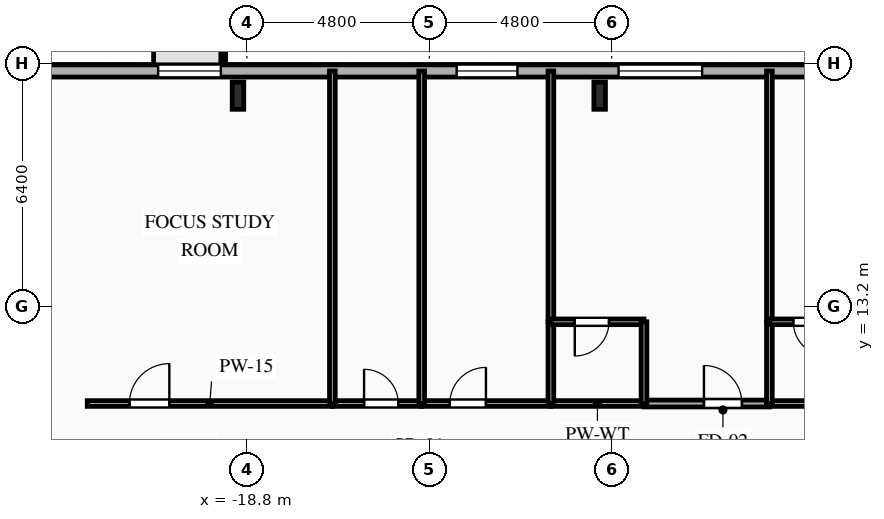
"""IFC4 building model, lengths in metres.
Left out: names, types, materials, properties, quantities, classifications, styles, units other than length and angle.
Written with IfcOpenShell. Run it as: python <this file> out.ifc"""

import sys

from ifc_helpers import new_model, si_unit, direction, frame, frame_2d, origin, origin_2d, place, context, subcontext, project, spatial, rectangle, i_section, extrude, element, fill, save


model = new_model("IFC4")
c1 = context("Model", 3, precision=1e-05, world=origin(), true_north=direction((0.0, 1.0)))
c2 = subcontext(c1, "Body", "Model", "MODEL_VIEW")
j1 = project(units=[si_unit("LENGTHUNIT", "METRE"), si_unit("PLANEANGLEUNIT", "RADIAN")], contexts=[c1])
p1 = place(None, origin())
s1 = spatial("IfcSite", under=j1, at=p1, CompositionType="ELEMENT")
p2 = place(p1, origin())
s2 = spatial("IfcBuilding", under=s1, at=p2, CompositionType="ELEMENT")
p3 = place(p2, frame((0.0, 0.0, 57.15)))
s3 = spatial("IfcBuildingStorey", under=s2, at=p3, CompositionType="ELEMENT", Elevation=57.15)
for number, where, z_axis, x_axis in (
    (1, (-9.517, 18.75, 0.0), (0.0, 0.0, 1.0), (1.0, 0.0, 0.0)),
    (2, (-19.033, 18.75, 0.0), (0.0, 0.0, 1.0), (1.0, 0.0, 0.0)),
):
    element("IfcColumn", number, at=place(p3, frame(where, z_axis=z_axis, x_axis=x_axis)), inside=s3, PredefinedType="COLUMN", context=c2, shape_type="SweptSolid", body=[
        extrude(i_section(OverallWidth=0.304, OverallDepth=0.716, WebThickness=0.021, FlangeThickness=0.04, FilletRadius=0.027, at=origin_2d()), origin(), (0.0, 0.0, 1.0), 3.35),
    ])
p4 = place(p3, frame((-29.2, 19.4, 0.0), z_axis=(0.0, 0.0, 1.0), x_axis=(1.0, 0.0, 0.0)))
e3 = element("IfcWall", 3, at=p4, inside=s3, PredefinedType="SOLIDWALL", context=c2, shape_type="SweptSolid", body=[
    extrude(rectangle(XDim=58.4, YDim=0.32, at=frame_2d((29.2, 0.0))), origin(), (0.0, 0.0, 1.0), 3.035),
])
p5 = place(p4, frame((8.065, 0.0, 0.85)))
e4 = element("IfcOpeningElement", 4, at=p5, cuts=e3, PredefinedType="OPENING", context=c2, shape_type="SweptSolid", body=[
    extrude(rectangle(XDim=1.65, YDim=1.85, at=frame_2d((0.825, 0.925))), frame((0.0, 0.17, 0.0), z_axis=(0.0, -1.0, 0.0), x_axis=(1.0, 0.0, 0.0)), (0.0, 0.0, 1.0), 0.34),
])
p6 = place(p4, frame((15.92, 0.0, 0.85)))
e5 = element("IfcOpeningElement", 5, at=p6, cuts=e3, PredefinedType="OPENING", context=c2, shape_type="SweptSolid", body=[
    extrude(rectangle(XDim=1.6, YDim=1.85, at=frame_2d((0.8, 0.925))), frame((0.0, 0.17, 0.0), z_axis=(0.0, -1.0, 0.0), x_axis=(1.0, 0.0, 0.0)), (0.0, 0.0, 1.0), 0.34),
])
p7 = place(p4, frame((20.18, 0.0, 0.85)))
e6 = element("IfcOpeningElement", 6, at=p7, cuts=e3, PredefinedType="OPENING", context=c2, shape_type="SweptSolid", body=[
    extrude(rectangle(XDim=2.2, YDim=1.85, at=frame_2d((1.1, 0.925))), frame((0.0, 0.17, 0.0), z_axis=(0.0, -1.0, 0.0), x_axis=(1.0, 0.0, 0.0)), (0.0, 0.0, 1.0), 0.34),
])
p8 = place(p4, frame((25.94, 0.0, 0.85)))
e7 = element("IfcOpeningElement", 7, at=p8, cuts=e3, PredefinedType="OPENING", context=c2, shape_type="SweptSolid", body=[
    extrude(rectangle(XDim=2.2, YDim=1.85, at=frame_2d((1.1, 0.925))), frame((0.0, 0.17, 0.0), z_axis=(0.0, -1.0, 0.0), x_axis=(1.0, 0.0, 0.0)), (0.0, 0.0, 1.0), 0.34),
])
p9 = place(p4, frame((31.7, 0.0, 0.85)))
e8 = element("IfcOpeningElement", 8, at=p9, cuts=e3, PredefinedType="OPENING", context=c2, shape_type="SweptSolid", body=[
    extrude(rectangle(XDim=2.2, YDim=1.85, at=frame_2d((1.1, 0.925))), frame((0.0, 0.17, 0.0), z_axis=(0.0, -1.0, 0.0), x_axis=(1.0, 0.0, 0.0)), (0.0, 0.0, 1.0), 0.34),
])
p10 = place(p4, frame((36.056, 0.0, 0.85)))
e9 = element("IfcOpeningElement", 9, at=p10, cuts=e3, PredefinedType="OPENING", context=c2, shape_type="SweptSolid", body=[
    extrude(rectangle(XDim=2.2, YDim=1.85, at=frame_2d((1.1, 0.925))), frame((0.0, 0.17, 0.0), z_axis=(0.0, -1.0, 0.0), x_axis=(1.0, 0.0, 0.0)), (0.0, 0.0, 1.0), 0.34),
])
p11 = place(p4, frame((43.22, 0.0, 0.85)))
e10 = element("IfcOpeningElement", 10, at=p11, cuts=e3, PredefinedType="OPENING", context=c2, shape_type="SweptSolid", body=[
    extrude(rectangle(XDim=2.2, YDim=1.85, at=frame_2d((1.1, 0.925))), frame((0.0, 0.17, 0.0), z_axis=(0.0, -1.0, 0.0), x_axis=(1.0, 0.0, 0.0)), (0.0, 0.0, 1.0), 0.34),
])
p12 = place(p4, frame((48.895, 0.0, 0.85)))
e11 = element("IfcOpeningElement", 11, at=p12, cuts=e3, PredefinedType="OPENING", context=c2, shape_type="SweptSolid", body=[
    extrude(rectangle(XDim=1.65, YDim=1.85, at=frame_2d((0.825, 0.925))), frame((0.0, 0.17, 0.0), z_axis=(0.0, -1.0, 0.0), x_axis=(1.0, 0.0, 0.0)), (0.0, 0.0, 1.0), 0.34),
])
p13 = place(p3, frame((-23.0, 10.65, 0.0), z_axis=(0.0, 0.0, 1.0), x_axis=(1.0, 0.0, 0.0)))
e12 = element("IfcWall", 12, at=p13, inside=s3, PredefinedType="PARTITIONING", context=c2, shape_type="SweptSolid", body=[
    extrude(rectangle(XDim=6.45, YDim=0.15, at=frame_2d((3.225, 0.0))), origin(), (0.0, 0.0, 1.0), 3.035),
])
p14 = place(p13, frame((1.11, 0.0, 0.0)))
e13 = element("IfcOpeningElement", 13, at=p14, cuts=e12, PredefinedType="OPENING", context=c2, shape_type="SweptSolid", body=[
    extrude(rectangle(XDim=1.05, YDim=2.15, at=frame_2d((0.525, 1.075))), frame((0.0, 0.085, 0.0), z_axis=(0.0, -1.0, 0.0), x_axis=(1.0, 0.0, 0.0)), (0.0, 0.0, 1.0), 0.17),
])
p15 = place(p3, frame((-16.55, 10.65, 0.0), z_axis=(0.0, 0.0, 1.0), x_axis=(1.0, 0.0, 0.0)))
e14 = element("IfcWall", 14, at=p15, inside=s3, PredefinedType="PLUMBINGWALL", context=c2, shape_type="SweptSolid", body=[
    extrude(rectangle(XDim=2.35, YDim=0.15, at=frame_2d((1.175, 0.0))), origin(), (0.0, 0.0, 1.0), 3.035),
])
p16 = place(p15, frame((0.834, 0.0, 0.0)))
e15 = element("IfcOpeningElement", 15, at=p16, cuts=e14, PredefinedType="OPENING", context=c2, shape_type="SweptSolid", body=[
    extrude(rectangle(XDim=0.9, YDim=2.1, at=frame_2d((0.45, 1.05))), frame((0.0, 0.085, 0.0), z_axis=(0.0, -1.0, 0.0), x_axis=(1.0, 0.0, 0.0)), (0.0, 0.0, 1.0), 0.17),
])
p17 = place(p3, frame((-14.2, 10.65, 0.0), z_axis=(0.0, 0.0, 1.0), x_axis=(1.0, 0.0, 0.0)))
e16 = element("IfcWall", 16, at=p17, inside=s3, PredefinedType="PARTITIONING", context=c2, shape_type="SweptSolid", body=[
    extrude(rectangle(XDim=3.4, YDim=0.15, at=frame_2d((1.7, 0.0))), origin(), (0.0, 0.0, 1.0), 3.035),
])
p18 = place(p17, frame((0.741, 0.0, 0.0)))
e17 = element("IfcOpeningElement", 17, at=p18, cuts=e16, PredefinedType="OPENING", context=c2, shape_type="SweptSolid", body=[
    extrude(rectangle(XDim=0.95, YDim=2.1, at=frame_2d((0.475, 1.05))), frame((0.0, 0.085, 0.0), z_axis=(0.0, -1.0, 0.0), x_axis=(1.0, 0.0, 0.0)), (0.0, 0.0, 1.0), 0.17),
])
p19 = place(p3, frame((-8.35, 10.65, 0.0), z_axis=(0.0, 0.0, 1.0), x_axis=(1.0, 0.0, 0.0)))
e18 = element("IfcWall", 18, at=p19, inside=s3, PredefinedType="PARTITIONING", context=c2, shape_type="SweptSolid", body=[
    extrude(rectangle(XDim=3.3, YDim=0.18, at=frame_2d((1.65, 0.0))), origin(), (0.0, 0.0, 1.0), 3.035),
])
p20 = place(p19, frame((1.577, 0.0, 0.0)))
e19 = element("IfcOpeningElement", 19, at=p20, cuts=e18, PredefinedType="OPENING", context=c2, shape_type="SweptSolid", body=[
    extrude(rectangle(XDim=1.0, YDim=2.15, at=frame_2d((0.5, 1.075))), frame((0.0, 0.1, 0.0), z_axis=(0.0, -1.0, 0.0), x_axis=(1.0, 0.0, 0.0)), (0.0, 0.0, 1.0), 0.2),
])
for number, where, z_axis, x_axis in (
    (20, (-10.8, 10.65, 0.0), (0.0, 0.0, 1.0), (1.0, 0.0, 0.0)),
    (21, (-5.05, 10.65, 0.0), (0.0, 0.0, 1.0), (1.0, 0.0, 0.0)),
):
    element("IfcWall", number, at=place(p3, frame(where, z_axis=z_axis, x_axis=x_axis)), inside=s3, PredefinedType="PLUMBINGWALL", context=c2, shape_type="SweptSolid", body=[
        extrude(rectangle(XDim=2.45, YDim=0.15, at=frame_2d((1.225, 0.0))), origin(), (0.0, 0.0, 1.0), 3.035),
    ])
for number, where, z_axis, x_axis in (
    (22, (-16.55, 19.4, 0.0), (0.0, 0.0, 1.0), (0.0, -1.0, 0.0)),
    (23, (-14.2, 19.4, 0.0), (0.0, 0.0, 1.0), (0.0, -1.0, 0.0)),
):
    element("IfcWall", number, at=place(p3, frame(where, z_axis=z_axis, x_axis=x_axis)), inside=s3, PredefinedType="PLUMBINGWALL", context=c2, shape_type="SweptSolid", body=[
        extrude(rectangle(XDim=8.75, YDim=0.15, at=frame_2d((4.375, 0.0))), origin(), (0.0, 0.0, 1.0), 3.035),
    ])
p21 = place(p3, frame((-10.8, 19.4, 0.0), z_axis=(0.0, 0.0, 1.0), x_axis=(0.0, -1.0, 0.0)))
e24 = element("IfcWall", 24, at=p21, inside=s3, PredefinedType="PARTITIONING", context=c2, shape_type="SweptSolid", body=[
    extrude(rectangle(XDim=6.6, YDim=0.15, at=frame_2d((3.3, 0.0))), origin(), (0.0, 0.0, 1.0), 3.035),
])
p22 = place(p3, frame((-10.8, 12.8, 0.0), z_axis=(0.0, 0.0, 1.0), x_axis=(0.0, -1.0, 0.0)))
e25 = element("IfcWall", 25, at=p22, inside=s3, PredefinedType="PLUMBINGWALL", context=c2, shape_type="SweptSolid", body=[
    extrude(rectangle(XDim=2.15, YDim=0.15, at=frame_2d((1.075, 0.0))), origin(), (0.0, 0.0, 1.0), 3.035),
])
p23 = place(p3, frame((-8.35, 12.8, 0.0), z_axis=(0.0, 0.0, 1.0), x_axis=(-1.0, 0.0, 0.0)))
e26 = element("IfcWall", 26, at=p23, inside=s3, PredefinedType="PLUMBINGWALL", context=c2, shape_type="SweptSolid", body=[
    extrude(rectangle(XDim=2.45, YDim=0.15, at=frame_2d((1.225, 0.0))), origin(), (0.0, 0.0, 1.0), 3.035),
])
p24 = place(p23, frame((0.921, 0.0, 0.0)))
e27 = element("IfcOpeningElement", 27, at=p24, cuts=e26, PredefinedType="OPENING", context=c2, shape_type="SweptSolid", body=[
    extrude(rectangle(XDim=0.9, YDim=2.1, at=frame_2d((0.45, 1.05))), frame((0.0, 0.085, 0.0), z_axis=(0.0, -1.0, 0.0), x_axis=(1.0, 0.0, 0.0)), (0.0, 0.0, 1.0), 0.17),
])
p25 = place(p3, frame((-8.35, 10.65, 0.0), z_axis=(0.0, 0.0, 1.0), x_axis=(0.0, 1.0, 0.0)))
e28 = element("IfcWall", 28, at=p25, inside=s3, PredefinedType="PLUMBINGWALL", context=c2, shape_type="SweptSolid", body=[
    extrude(rectangle(XDim=2.15, YDim=0.15, at=frame_2d((1.075, 0.0))), origin(), (0.0, 0.0, 1.0), 3.035),
])
p26 = place(p3, frame((-5.05, 19.4, 0.0), z_axis=(0.0, 0.0, 1.0), x_axis=(0.0, -1.0, 0.0)))
e29 = element("IfcWall", 29, at=p26, inside=s3, PredefinedType="PARTITIONING", context=c2, shape_type="SweptSolid", body=[
    extrude(rectangle(XDim=6.6, YDim=0.15, at=frame_2d((3.3, 0.0))), origin(), (0.0, 0.0, 1.0), 3.035),
])
p27 = place(p3, frame((-5.05, 12.8, 0.0), z_axis=(0.0, 0.0, 1.0), x_axis=(0.0, -1.0, 0.0)))
e30 = element("IfcWall", 30, at=p27, inside=s3, PredefinedType="PLUMBINGWALL", context=c2, shape_type="SweptSolid", body=[
    extrude(rectangle(XDim=2.15, YDim=0.15, at=frame_2d((1.075, 0.0))), origin(), (0.0, 0.0, 1.0), 3.035),
])
p28 = place(p3, frame((-2.6, 12.8, 0.0), z_axis=(0.0, 0.0, 1.0), x_axis=(-1.0, 0.0, 0.0)))
e31 = element("IfcWall", 31, at=p28, inside=s3, PredefinedType="PLUMBINGWALL", context=c2, shape_type="SweptSolid", body=[
    extrude(rectangle(XDim=2.45, YDim=0.15, at=frame_2d((1.225, 0.0))), origin(), (0.0, 0.0, 1.0), 3.035),
])
p29 = place(p28, frame((0.921, 0.0, 0.0)))
e32 = element("IfcOpeningElement", 32, at=p29, cuts=e31, PredefinedType="OPENING", context=c2, shape_type="SweptSolid", body=[
    extrude(rectangle(XDim=0.9, YDim=2.1, at=frame_2d((0.45, 1.05))), frame((0.0, 0.085, 0.0), z_axis=(0.0, -1.0, 0.0), x_axis=(1.0, 0.0, 0.0)), (0.0, 0.0, 1.0), 0.17),
])
p30 = place(p5, origin())
e33 = element("IfcWindow", 33, at=p30, inside=s3, PartitioningType="SINGLE_PANEL", PredefinedType="WINDOW", context=c2, shape_type="SweptSolid", body=[
    extrude(rectangle(XDim=1.65, YDim=1.85, at=frame_2d((0.825, 0.925))), frame((0.0, 0.03, 0.0), z_axis=(0.0, -1.0, 0.0), x_axis=(1.0, 0.0, 0.0)), (0.0, 0.0, 1.0), 0.06),
])
fill(e4, e33)
p31 = place(p6, origin())
e34 = element("IfcWindow", 34, at=p31, inside=s3, PartitioningType="SINGLE_PANEL", PredefinedType="WINDOW", context=c2, shape_type="SweptSolid", body=[
    extrude(rectangle(XDim=1.6, YDim=1.85, at=frame_2d((0.8, 0.925))), frame((0.0, 0.03, 0.0), z_axis=(0.0, -1.0, 0.0), x_axis=(1.0, 0.0, 0.0)), (0.0, 0.0, 1.0), 0.06),
])
fill(e5, e34)
p32 = place(p7, origin())
e35 = element("IfcWindow", 35, at=p32, inside=s3, PartitioningType="SINGLE_PANEL", PredefinedType="WINDOW", context=c2, shape_type="SweptSolid", body=[
    extrude(rectangle(XDim=2.2, YDim=1.85, at=frame_2d((1.1, 0.925))), frame((0.0, 0.03, 0.0), z_axis=(0.0, -1.0, 0.0), x_axis=(1.0, 0.0, 0.0)), (0.0, 0.0, 1.0), 0.06),
])
fill(e6, e35)
p33 = place(p14, origin())
e36 = element("IfcDoor", 36, at=p33, inside=s3, OperationType="SINGLE_SWING_RIGHT", PredefinedType="DOOR", context=c2, shape_type="SweptSolid", body=[
    extrude(rectangle(XDim=1.05, YDim=2.15, at=frame_2d((0.525, 1.075))), frame((0.0, 0.025, 0.0), z_axis=(0.0, -1.0, 0.0), x_axis=(1.0, 0.0, 0.0)), (0.0, 0.0, 1.0), 0.05),
])
fill(e13, e36)
p34 = place(p16, origin())
e37 = element("IfcDoor", 37, at=p34, inside=s3, OperationType="SINGLE_SWING_LEFT", PredefinedType="DOOR", context=c2, shape_type="SweptSolid", body=[
    extrude(rectangle(XDim=0.9, YDim=2.1, at=frame_2d((0.45, 1.05))), frame((0.0, 0.025, 0.0), z_axis=(0.0, -1.0, 0.0), x_axis=(1.0, 0.0, 0.0)), (0.0, 0.0, 1.0), 0.05),
])
fill(e15, e37)
p35 = place(p18, origin())
e38 = element("IfcDoor", 38, at=p35, inside=s3, OperationType="SINGLE_SWING_RIGHT", PredefinedType="DOOR", context=c2, shape_type="SweptSolid", body=[
    extrude(rectangle(XDim=0.95, YDim=2.1, at=frame_2d((0.475, 1.05))), frame((0.0, 0.025, 0.0), z_axis=(0.0, -1.0, 0.0), x_axis=(1.0, 0.0, 0.0)), (0.0, 0.0, 1.0), 0.05),
])
fill(e17, e38)
p36 = place(p20, origin())
e39 = element("IfcDoor", 39, at=p36, inside=s3, OperationType="SINGLE_SWING_LEFT", PredefinedType="DOOR", context=c2, shape_type="SweptSolid", body=[
    extrude(rectangle(XDim=1.0, YDim=2.15, at=frame_2d((0.5, 1.075))), frame((0.0, 0.025, 0.0), z_axis=(0.0, -1.0, 0.0), x_axis=(1.0, 0.0, 0.0)), (0.0, 0.0, 1.0), 0.05),
])
fill(e19, e39)
p37 = place(p24, origin())
e40 = element("IfcDoor", 40, at=p37, inside=s3, OperationType="SINGLE_SWING_RIGHT", PredefinedType="DOOR", context=c2, shape_type="SweptSolid", body=[
    extrude(rectangle(XDim=0.9, YDim=2.1, at=frame_2d((0.45, 1.05))), frame((0.0, 0.025, 0.0), z_axis=(0.0, -1.0, 0.0), x_axis=(1.0, 0.0, 0.0)), (0.0, 0.0, 1.0), 0.05),
])
fill(e27, e40)
p38 = place(p29, origin())
e41 = element("IfcDoor", 41, at=p38, inside=s3, OperationType="SINGLE_SWING_LEFT", PredefinedType="DOOR", context=c2, shape_type="SweptSolid", body=[
    extrude(rectangle(XDim=0.9, YDim=2.1, at=frame_2d((0.45, 1.05))), frame((0.0, 0.025, 0.0), z_axis=(0.0, -1.0, 0.0), x_axis=(1.0, 0.0, 0.0)), (0.0, 0.0, 1.0), 0.05),
])
fill(e32, e41)
save(model, sys.argv[1])
